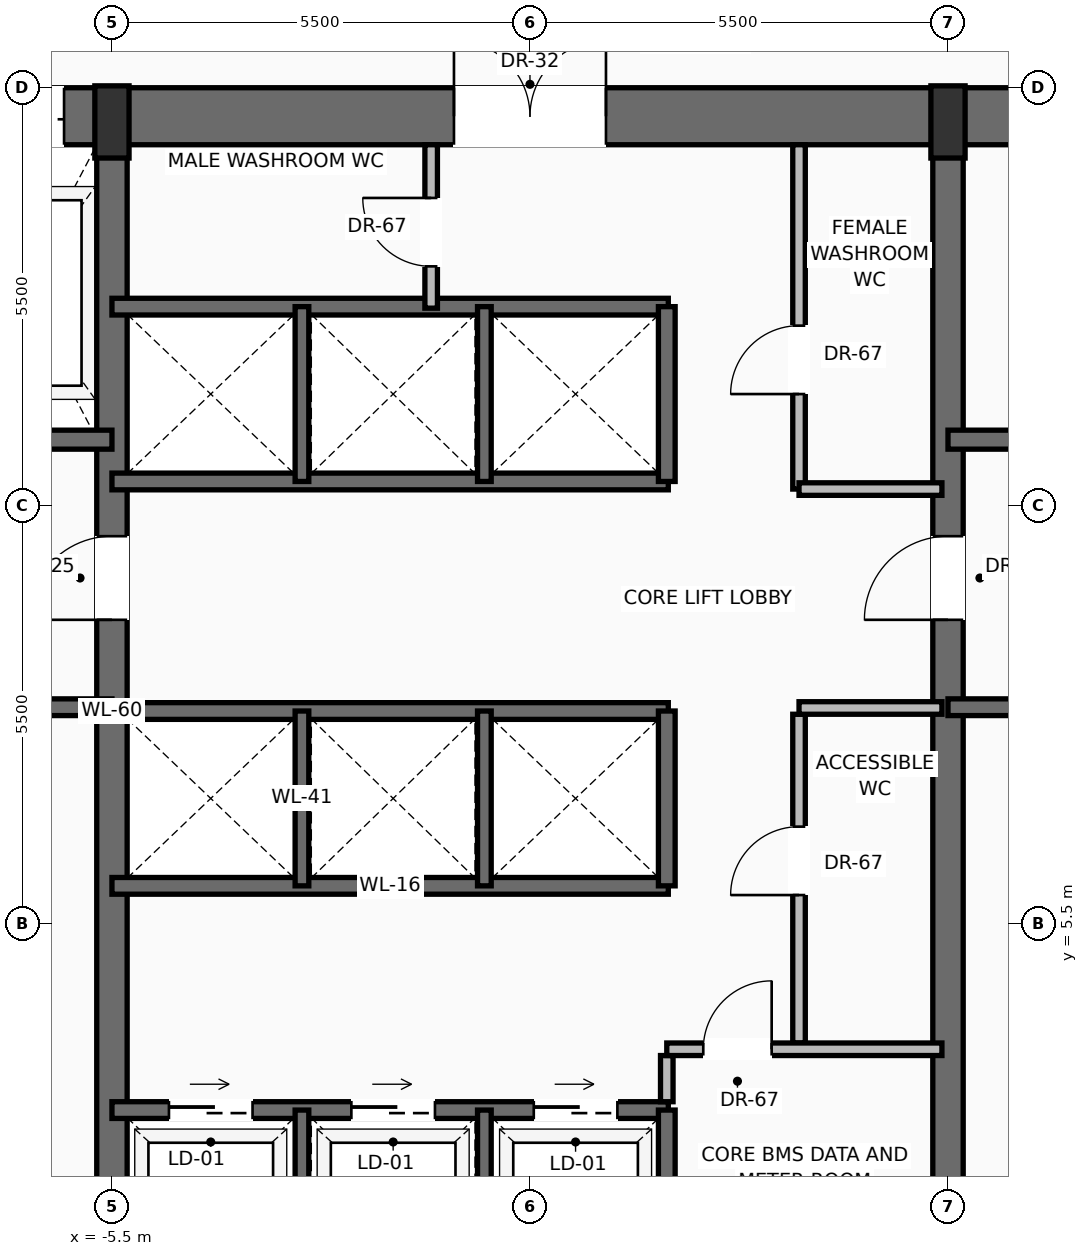
"""IFC4 building model, lengths in metres.
Left out: names, types, materials, properties, quantities, classifications, styles, units other than length and angle.
Written with IfcOpenShell. Run it as: python <this file> out.ifc"""

import sys

from ifc_helpers import new_model, si_unit, direction, frame, frame_2d, origin, origin_2d, place, context, subcontext, project, spatial, rectangle, extrude, source, transform, mapped, element, fill, save


model = new_model("IFC4")
c1 = context("Model", 3, precision=1e-05, world=origin(), true_north=direction((0.0, 1.0)))
c2 = subcontext(c1, "Body", "Model", "MODEL_VIEW")
j1 = project(units=[si_unit("LENGTHUNIT", "METRE"), si_unit("PLANEANGLEUNIT", "RADIAN")], contexts=[c1])
p1 = place(None, origin())
s1 = spatial("IfcSite", under=j1, at=p1, CompositionType="ELEMENT")
p2 = place(p1, origin())
s2 = spatial("IfcBuilding", under=s1, at=p2, CompositionType="ELEMENT")
p3 = place(p2, frame((0.0, 0.0, 87.7)))
s3 = spatial("IfcBuildingStorey", under=s2, at=p3, CompositionType="ELEMENT", Elevation=87.7)
p4 = place(p3, frame((-10.9, 16.125, 0.0), z_axis=(0.0, 0.0, 1.0), x_axis=(1.0, 0.0, 0.0)))
e1 = element("IfcWall", 1, at=p4, inside=s3, PredefinedType="SHEAR", context=c2, shape_type="SweptSolid", body=[
    extrude(rectangle(XDim=21.8, YDim=0.75, at=frame_2d((10.9, 0.0))), origin(), (0.0, 0.0, 1.0), 3.45),
])
p5 = place(p4, frame((3.47, 0.0, 0.0)))
e2 = element("IfcOpeningElement", 2, at=p5, cuts=e1, PredefinedType="OPENING", context=c2, shape_type="SweptSolid", body=[
    extrude(rectangle(XDim=1.3, YDim=2.3, at=frame_2d((0.65, 1.15))), frame((0.0, 0.385, 0.0), z_axis=(0.0, -1.0, 0.0), x_axis=(1.0, 0.0, 0.0)), (0.0, 0.0, 1.0), 0.77),
])
p6 = place(p4, frame((9.9, 0.0, 0.0)))
e3 = element("IfcOpeningElement", 3, at=p6, cuts=e1, PredefinedType="OPENING", context=c2, shape_type="SweptSolid", body=[
    extrude(rectangle(XDim=2.0, YDim=2.4, at=frame_2d((1.0, 1.2))), frame((0.0, 0.385, 0.0), z_axis=(0.0, -1.0, 0.0), x_axis=(1.0, 0.0, 0.0)), (0.0, 0.0, 1.0), 0.77),
])
p7 = place(p3, frame((-5.5, 0.475, 0.0), z_axis=(0.0, 0.0, 1.0), x_axis=(0.0, 1.0, 0.0)))
e4 = element("IfcWall", 4, at=p7, inside=s3, PredefinedType="SHEAR", context=c2, shape_type="SweptSolid", body=[
    extrude(rectangle(XDim=15.65, YDim=0.4, at=frame_2d((7.825, 0.0))), origin(), (0.0, 0.0, 1.0), 3.45),
])
p8 = place(p7, frame((9.025, 0.0, 0.0)))
e5 = element("IfcOpeningElement", 5, at=p8, cuts=e4, PredefinedType="OPENING", context=c2, shape_type="SweptSolid", body=[
    extrude(rectangle(XDim=1.1, YDim=2.2, at=frame_2d((0.55, 1.1))), frame((0.0, 0.21, 0.0), z_axis=(0.0, -1.0, 0.0), x_axis=(1.0, 0.0, 0.0)), (0.0, 0.0, 1.0), 0.42),
])
p9 = place(p3, frame((5.5, 0.475, 0.0), z_axis=(0.0, 0.0, 1.0), x_axis=(0.0, 1.0, 0.0)))
e6 = element("IfcWall", 6, at=p9, inside=s3, PredefinedType="SHEAR", context=c2, shape_type="SweptSolid", body=[
    extrude(rectangle(XDim=15.65, YDim=0.4, at=frame_2d((7.825, 0.0))), origin(), (0.0, 0.0, 1.0), 3.45),
])
p10 = place(p9, frame((9.025, 0.0, 0.0)))
e7 = element("IfcOpeningElement", 7, at=p10, cuts=e6, PredefinedType="OPENING", context=c2, shape_type="SweptSolid", body=[
    extrude(rectangle(XDim=1.1, YDim=2.2, at=frame_2d((0.55, 1.1))), frame((0.0, 0.21, 0.0), z_axis=(0.0, -1.0, 0.0), x_axis=(1.0, 0.0, 0.0)), (0.0, 0.0, 1.0), 0.42),
])
m1 = source(origin(), c2, "Body", "SweptSolid", [
    extrude(rectangle(XDim=0.45, YDim=0.95, at=origin_2d()), origin(), (0.0, 0.0, 1.0), 3.7),
])
for number, where, z_axis, x_axis in (
    (8, (-5.5, 16.05, 0.0), (0.0, 0.0, 1.0), (1.0, 0.0, 0.0)),
    (9, (5.5, 16.05, 0.0), (0.0, 0.0, 1.0), (1.0, 0.0, 0.0)),
):
    element("IfcColumn", number, at=place(p3, frame(where, z_axis=z_axis, x_axis=x_axis)), inside=s3, PredefinedType="PILASTER", context=c2, shape_type="MappedRepresentation", body=[
        mapped(m1, transform((0.0, 0.0, 0.0), scale=1.0)),
    ])
p11 = place(p3, frame((-5.5, 8.35, 0.0), z_axis=(0.0, 0.0, 1.0), x_axis=(-1.0, 0.0, 0.0)))
e10 = element("IfcWall", 10, at=p11, inside=s3, PredefinedType="SOLIDWALL", context=c2, shape_type="SweptSolid", body=[
    extrude(rectangle(XDim=4.65, YDim=0.22, at=frame_2d((2.325, 0.0))), origin(), (0.0, 0.0, 1.0), 3.45),
])
p12 = place(p11, frame((2.5, 0.0, 0.0)))
e11 = element("IfcOpeningElement", 11, at=p12, cuts=e10, PredefinedType="OPENING", context=c2, shape_type="SweptSolid", body=[
    extrude(rectangle(XDim=1.15, YDim=2.2, at=frame_2d((0.575, 1.1))), frame((0.0, 0.12, 0.0), z_axis=(0.0, -1.0, 0.0), x_axis=(1.0, 0.0, 0.0)), (0.0, 0.0, 1.0), 0.24),
])
p13 = place(p3, frame((-5.5, 11.87, 0.0), z_axis=(0.0, 0.0, 1.0), x_axis=(-1.0, 0.0, 0.0)))
e12 = element("IfcWall", 12, at=p13, inside=s3, PredefinedType="SOLIDWALL", context=c2, shape_type="SweptSolid", body=[
    extrude(rectangle(XDim=4.65, YDim=0.25, at=frame_2d((2.325, 0.0))), origin(), (0.0, 0.0, 1.0), 3.45),
])
p14 = place(p13, frame((2.95, 0.0, 0.0)))
e13 = element("IfcOpeningElement", 13, at=p14, cuts=e12, PredefinedType="OPENING", context=c2, shape_type="SweptSolid", body=[
    extrude(rectangle(XDim=1.2, YDim=2.25, at=frame_2d((0.6, 1.125))), frame((0.0, 0.135, 0.0), z_axis=(0.0, -1.0, 0.0), x_axis=(1.0, 0.0, 0.0)), (0.0, 0.0, 1.0), 0.27),
])
p15 = place(p3, frame((10.15, 8.35, 0.0), z_axis=(0.0, 0.0, 1.0), x_axis=(-1.0, 0.0, 0.0)))
e14 = element("IfcWall", 14, at=p15, inside=s3, PredefinedType="SOLIDWALL", context=c2, shape_type="SweptSolid", body=[
    extrude(rectangle(XDim=4.65, YDim=0.22, at=frame_2d((2.325, 0.0))), origin(), (0.0, 0.0, 1.0), 3.45),
])
p16 = place(p15, frame((1.0, 0.0, 0.0)))
e15 = element("IfcOpeningElement", 15, at=p16, cuts=e14, PredefinedType="OPENING", context=c2, shape_type="SweptSolid", body=[
    extrude(rectangle(XDim=1.15, YDim=2.2, at=frame_2d((0.575, 1.1))), frame((0.0, 0.12, 0.0), z_axis=(0.0, -1.0, 0.0), x_axis=(1.0, 0.0, 0.0)), (0.0, 0.0, 1.0), 0.24),
])
p17 = place(p3, frame((10.15, 11.87, 0.0), z_axis=(0.0, 0.0, 1.0), x_axis=(-1.0, 0.0, 0.0)))
e16 = element("IfcWall", 16, at=p17, inside=s3, PredefinedType="SOLIDWALL", context=c2, shape_type="SweptSolid", body=[
    extrude(rectangle(XDim=4.65, YDim=0.25, at=frame_2d((2.325, 0.0))), origin(), (0.0, 0.0, 1.0), 3.45),
])
p18 = place(p17, frame((0.5, 0.0, 0.0)))
e17 = element("IfcOpeningElement", 17, at=p18, cuts=e16, PredefinedType="OPENING", context=c2, shape_type="SweptSolid", body=[
    extrude(rectangle(XDim=1.2, YDim=2.25, at=frame_2d((0.6, 1.125))), frame((0.0, 0.135, 0.0), z_axis=(0.0, -1.0, 0.0), x_axis=(1.0, 0.0, 0.0)), (0.0, 0.0, 1.0), 0.27),
])
p19 = place(p3, frame((-5.5, 3.05, 0.0), z_axis=(0.0, 0.0, 1.0), x_axis=(1.0, 0.0, 0.0)))
e18 = element("IfcWall", 18, at=p19, inside=s3, PredefinedType="SOLIDWALL", context=c2, shape_type="SweptSolid", body=[
    extrude(rectangle(XDim=7.32, YDim=0.22, at=frame_2d((3.66, 0.0))), origin(), (0.0, 0.0, 1.0), 3.45),
])
p20 = place(p19, frame((0.75, 0.0, 0.0)))
e19 = element("IfcOpeningElement", 19, at=p20, cuts=e18, PredefinedType="OPENING", context=c2, shape_type="SweptSolid", body=[
    extrude(rectangle(XDim=1.1, YDim=2.2, at=frame_2d((0.55, 1.1))), frame((0.0, 0.12, 0.0), z_axis=(0.0, -1.0, 0.0), x_axis=(1.0, 0.0, 0.0)), (0.0, 0.0, 1.0), 0.24),
])
p21 = place(p19, frame((3.15, 0.0, 0.0)))
e20 = element("IfcOpeningElement", 20, at=p21, cuts=e18, PredefinedType="OPENING", context=c2, shape_type="SweptSolid", body=[
    extrude(rectangle(XDim=1.1, YDim=2.2, at=frame_2d((0.55, 1.1))), frame((0.0, 0.12, 0.0), z_axis=(0.0, -1.0, 0.0), x_axis=(1.0, 0.0, 0.0)), (0.0, 0.0, 1.0), 0.24),
])
p22 = place(p19, frame((5.55, 0.0, 0.0)))
e21 = element("IfcOpeningElement", 21, at=p22, cuts=e18, PredefinedType="OPENING", context=c2, shape_type="SweptSolid", body=[
    extrude(rectangle(XDim=1.1, YDim=2.2, at=frame_2d((0.55, 1.1))), frame((0.0, 0.12, 0.0), z_axis=(0.0, -1.0, 0.0), x_axis=(1.0, 0.0, 0.0)), (0.0, 0.0, 1.0), 0.24),
])
p23 = place(p3, frame((1.8, 0.85, 0.0), z_axis=(0.0, 0.0, 1.0), x_axis=(0.0, 1.0, 0.0)))
e22 = element("IfcWall", 22, at=p23, inside=s3, PredefinedType="SOLIDWALL", context=c2, shape_type="SweptSolid", body=[
    extrude(rectangle(XDim=2.2, YDim=0.22, at=frame_2d((1.1, 0.0))), origin(), (0.0, 0.0, 1.0), 3.45),
])
for number, where, z_axis, x_axis in (
    (23, (-3.0, 0.85, 0.0), (0.0, 0.0, 1.0), (0.0, 1.0, 0.0)),
    (24, (-0.6, 0.85, 0.0), (0.0, 0.0, 1.0), (0.0, 1.0, 0.0)),
):
    element("IfcWall", number, at=place(p3, frame(where, z_axis=z_axis, x_axis=x_axis)), inside=s3, PredefinedType="SOLIDWALL", context=c2, shape_type="SweptSolid", body=[
        extrude(rectangle(XDim=2.2, YDim=0.18, at=frame_2d((1.1, 0.0))), origin(), (0.0, 0.0, 1.0), 3.45),
    ])
p24 = place(p3, frame((1.8, 3.16, 0.0), z_axis=(0.0, 0.0, 1.0), x_axis=(0.0, 1.0, 0.0)))
e25 = element("IfcWall", 25, at=p24, inside=s3, PredefinedType="PARTITIONING", context=c2, shape_type="SweptSolid", body=[
    extrude(rectangle(XDim=0.608, YDim=0.165, at=frame_2d((0.304, 0.0))), origin(), (0.0, 0.0, 1.0), 3.442),
])
p25 = place(p3, frame((3.54, 3.933, 0.0), z_axis=(0.0, 0.0, 1.0), x_axis=(0.0, 1.0, 0.0)))
e26 = element("IfcWall", 26, at=p25, inside=s3, PredefinedType="PARTITIONING", context=c2, shape_type="SweptSolid", body=[
    extrude(rectangle(XDim=4.325, YDim=0.165, at=frame_2d((2.163, 0.0))), origin(), (0.0, 0.0, 1.0), 3.442),
])
p26 = place(p25, frame((1.946, 0.0, 0.0)))
e27 = element("IfcOpeningElement", 27, at=p26, cuts=e26, PredefinedType="OPENING", context=c2, shape_type="SweptSolid", body=[
    extrude(rectangle(XDim=0.9, YDim=2.1, at=frame_2d((0.45, 1.05))), frame((0.0, 0.093, 0.0), z_axis=(0.0, -1.0, 0.0), x_axis=(1.0, 0.0, 0.0)), (0.0, 0.0, 1.0), 0.185),
])
p27 = place(p3, frame((3.54, 8.34, 0.0), z_axis=(0.0, 0.0, 1.0), x_axis=(1.0, 0.0, 0.0)))
e28 = element("IfcWall", 28, at=p27, inside=s3, PredefinedType="PARTITIONING", context=c2, shape_type="SweptSolid", body=[
    extrude(rectangle(XDim=1.88, YDim=0.165, at=frame_2d((0.94, 0.0))), origin(), (0.0, 0.0, 1.0), 3.442),
])
p28 = place(p3, frame((1.8, 3.85, 0.0), z_axis=(0.0, 0.0, 1.0), x_axis=(1.0, 0.0, 0.0)))
e29 = element("IfcWall", 29, at=p28, inside=s3, PredefinedType="PARTITIONING", context=c2, shape_type="SweptSolid", body=[
    extrude(rectangle(XDim=3.62, YDim=0.165, at=frame_2d((1.81, 0.0))), origin(), (0.0, 0.0, 1.0), 3.442),
])
p29 = place(p28, frame((0.48, 0.0, 0.0)))
e30 = element("IfcOpeningElement", 30, at=p29, cuts=e29, PredefinedType="OPENING", context=c2, shape_type="SweptSolid", body=[
    extrude(rectangle(XDim=0.9, YDim=2.1, at=frame_2d((0.45, 1.05))), frame((0.0, 0.093, 0.0), z_axis=(0.0, -1.0, 0.0), x_axis=(1.0, 0.0, 0.0)), (0.0, 0.0, 1.0), 0.185),
])
for number, where, z_axis, x_axis in (
    (31, (-5.5, 6.0, 0.0), (0.0, 0.0, 1.0), (1.0, 0.0, 0.0)),
    (32, (-5.5, 8.3, 0.0), (0.0, 0.0, 1.0), (1.0, 0.0, 0.0)),
):
    element("IfcWall", number, at=place(p3, frame(where, z_axis=z_axis, x_axis=x_axis)), inside=s3, PredefinedType="SOLIDWALL", context=c2, shape_type="SweptSolid", body=[
        extrude(rectangle(XDim=7.32, YDim=0.22, at=frame_2d((3.66, 0.0))), origin(), (0.0, 0.0, 1.0), 3.45),
    ])
p30 = place(p3, frame((1.8, 6.0, 0.0), z_axis=(0.0, 0.0, 1.0), x_axis=(0.0, 1.0, 0.0)))
e33 = element("IfcWall", 33, at=p30, inside=s3, PredefinedType="SOLIDWALL", context=c2, shape_type="SweptSolid", body=[
    extrude(rectangle(XDim=2.3, YDim=0.22, at=frame_2d((1.15, 0.0))), origin(), (0.0, 0.0, 1.0), 3.45),
])
for number, where, z_axis, x_axis in (
    (34, (-3.0, 6.0, 0.0), (0.0, 0.0, 1.0), (0.0, 1.0, 0.0)),
    (35, (-0.6, 6.0, 0.0), (0.0, 0.0, 1.0), (0.0, 1.0, 0.0)),
):
    element("IfcWall", number, at=place(p3, frame(where, z_axis=z_axis, x_axis=x_axis)), inside=s3, PredefinedType="SOLIDWALL", context=c2, shape_type="SweptSolid", body=[
        extrude(rectangle(XDim=2.3, YDim=0.18, at=frame_2d((1.15, 0.0))), origin(), (0.0, 0.0, 1.0), 3.45),
    ])
for number, where, z_axis, x_axis in (
    (36, (-5.5, 11.32, 0.0), (0.0, 0.0, 1.0), (1.0, 0.0, 0.0)),
    (37, (-5.5, 13.62, 0.0), (0.0, 0.0, 1.0), (1.0, 0.0, 0.0)),
):
    element("IfcWall", number, at=place(p3, frame(where, z_axis=z_axis, x_axis=x_axis)), inside=s3, PredefinedType="SOLIDWALL", context=c2, shape_type="SweptSolid", body=[
        extrude(rectangle(XDim=7.32, YDim=0.22, at=frame_2d((3.66, 0.0))), origin(), (0.0, 0.0, 1.0), 3.45),
    ])
p31 = place(p3, frame((1.8, 11.32, 0.0), z_axis=(0.0, 0.0, 1.0), x_axis=(0.0, 1.0, 0.0)))
e38 = element("IfcWall", 38, at=p31, inside=s3, PredefinedType="SOLIDWALL", context=c2, shape_type="SweptSolid", body=[
    extrude(rectangle(XDim=2.3, YDim=0.22, at=frame_2d((1.15, 0.0))), origin(), (0.0, 0.0, 1.0), 3.45),
])
for number, where, z_axis, x_axis in (
    (39, (-3.0, 11.32, 0.0), (0.0, 0.0, 1.0), (0.0, 1.0, 0.0)),
    (40, (-0.6, 11.32, 0.0), (0.0, 0.0, 1.0), (0.0, 1.0, 0.0)),
):
    element("IfcWall", number, at=place(p3, frame(where, z_axis=z_axis, x_axis=x_axis)), inside=s3, PredefinedType="SOLIDWALL", context=c2, shape_type="SweptSolid", body=[
        extrude(rectangle(XDim=2.3, YDim=0.18, at=frame_2d((1.15, 0.0))), origin(), (0.0, 0.0, 1.0), 3.45),
    ])
p32 = place(p3, frame((-1.3, 13.6, 0.0), z_axis=(0.0, 0.0, 1.0), x_axis=(0.0, 1.0, 0.0)))
e41 = element("IfcWall", 41, at=p32, inside=s3, PredefinedType="PARTITIONING", context=c2, shape_type="SweptSolid", body=[
    extrude(rectangle(XDim=2.15, YDim=0.165, at=frame_2d((1.075, 0.0))), origin(), (0.0, 0.0, 1.0), 3.442),
])
p33 = place(p32, frame((0.55, 0.0, 0.0)))
e42 = element("IfcOpeningElement", 42, at=p33, cuts=e41, PredefinedType="OPENING", context=c2, shape_type="SweptSolid", body=[
    extrude(rectangle(XDim=0.9, YDim=2.1, at=frame_2d((0.45, 1.05))), frame((0.0, 0.093, 0.0), z_axis=(0.0, -1.0, 0.0), x_axis=(1.0, 0.0, 0.0)), (0.0, 0.0, 1.0), 0.185),
])
p34 = place(p3, frame((3.54, 11.22, 0.0), z_axis=(0.0, 0.0, 1.0), x_axis=(0.0, 1.0, 0.0)))
e43 = element("IfcWall", 43, at=p34, inside=s3, PredefinedType="PARTITIONING", context=c2, shape_type="SweptSolid", body=[
    extrude(rectangle(XDim=4.53, YDim=0.165, at=frame_2d((2.265, 0.0))), origin(), (0.0, 0.0, 1.0), 3.442),
])
p35 = place(p34, frame((1.25, 0.0, 0.0)))
e44 = element("IfcOpeningElement", 44, at=p35, cuts=e43, PredefinedType="OPENING", context=c2, shape_type="SweptSolid", body=[
    extrude(rectangle(XDim=0.9, YDim=2.1, at=frame_2d((0.45, 1.05))), frame((0.0, 0.093, 0.0), z_axis=(0.0, -1.0, 0.0), x_axis=(1.0, 0.0, 0.0)), (0.0, 0.0, 1.0), 0.185),
])
p36 = place(p3, frame((3.54, 11.22, 0.0), z_axis=(0.0, 0.0, 1.0), x_axis=(1.0, 0.0, 0.0)))
e45 = element("IfcWall", 45, at=p36, inside=s3, PredefinedType="PARTITIONING", context=c2, shape_type="SweptSolid", body=[
    extrude(rectangle(XDim=1.88, YDim=0.165, at=frame_2d((0.94, 0.0))), origin(), (0.0, 0.0, 1.0), 3.442),
])
m2 = source(origin(), c2, "Body", "SweptSolid", [
    extrude(rectangle(XDim=1.1, YDim=2.2, at=frame_2d((0.55, 1.1))), frame((0.0, 0.025, 0.0), z_axis=(0.0, -1.0, 0.0), x_axis=(1.0, 0.0, 0.0)), (0.0, 0.0, 1.0), 0.05),
])
p37 = place(p8, origin())
e46 = element("IfcDoor", 46, at=p37, inside=s3, OperationType="SINGLE_SWING_LEFT", PredefinedType="DOOR", context=c2, shape_type="MappedRepresentation", body=[
    mapped(m2, transform((0.0, 0.0, 0.0), scale=1.0)),
])
fill(e5, e46)
m3 = source(origin(), c2, "Body", "SweptSolid", [
    extrude(rectangle(XDim=1.3, YDim=2.3, at=frame_2d((0.65, 1.15))), frame((0.0, 0.025, 0.0), z_axis=(0.0, -1.0, 0.0), x_axis=(1.0, 0.0, 0.0)), (0.0, 0.0, 1.0), 0.05),
])
p38 = place(p5, origin())
e47 = element("IfcDoor", 47, at=p38, inside=s3, OperationType="SLIDING_TO_RIGHT", PredefinedType="DOOR", context=c2, shape_type="MappedRepresentation", body=[
    mapped(m3, transform((0.0, 0.0, 0.0), scale=1.0)),
])
fill(e2, e47)
p39 = place(p10, origin())
e48 = element("IfcDoor", 48, at=p39, inside=s3, OperationType="SINGLE_SWING_LEFT", PredefinedType="DOOR", context=c2, shape_type="MappedRepresentation", body=[
    mapped(m2, transform((0.0, 0.0, 0.0), scale=1.0)),
])
fill(e7, e48)
m4 = source(origin(), c2, "Body", "SweptSolid", [
    extrude(rectangle(XDim=2.0, YDim=2.4, at=frame_2d((1.0, 1.2))), frame((0.0, 0.025, 0.0), z_axis=(0.0, -1.0, 0.0), x_axis=(1.0, 0.0, 0.0)), (0.0, 0.0, 1.0), 0.05),
])
p40 = place(p6, origin())
e49 = element("IfcDoor", 49, at=p40, inside=s3, OperationType="DOUBLE_DOOR_SINGLE_SWING", PredefinedType="DOOR", context=c2, shape_type="MappedRepresentation", body=[
    mapped(m4, transform((0.0, 0.0, 0.0), scale=1.0)),
])
fill(e3, e49)
m5 = source(origin(), c2, "Body", "SweptSolid", [
    extrude(rectangle(XDim=1.1, YDim=2.2, at=frame_2d((0.55, 1.1))), frame((0.0, 0.025, 0.0), z_axis=(0.0, -1.0, 0.0), x_axis=(1.0, 0.0, 0.0)), (0.0, 0.0, 1.0), 0.05),
])
p41 = place(p20, origin())
e50 = element("IfcDoor", 50, at=p41, inside=s3, OperationType="SLIDING_TO_RIGHT", PredefinedType="DOOR", context=c2, shape_type="MappedRepresentation", body=[
    mapped(m5, transform((0.0, 0.0, 0.0), scale=1.0)),
])
fill(e19, e50)
p42 = place(p21, origin())
e51 = element("IfcDoor", 51, at=p42, inside=s3, OperationType="SLIDING_TO_RIGHT", PredefinedType="DOOR", context=c2, shape_type="MappedRepresentation", body=[
    mapped(m5, transform((0.0, 0.0, 0.0), scale=1.0)),
])
fill(e20, e51)
p43 = place(p22, origin())
e52 = element("IfcDoor", 52, at=p43, inside=s3, OperationType="SLIDING_TO_RIGHT", PredefinedType="DOOR", context=c2, shape_type="MappedRepresentation", body=[
    mapped(m5, transform((0.0, 0.0, 0.0), scale=1.0)),
])
fill(e21, e52)
m6 = source(origin(), c2, "Body", "SweptSolid", [
    extrude(rectangle(XDim=0.9, YDim=2.1, at=frame_2d((0.45, 1.05))), frame((0.0, 0.025, 0.0), z_axis=(0.0, -1.0, 0.0), x_axis=(1.0, 0.0, 0.0)), (0.0, 0.0, 1.0), 0.05),
])
p44 = place(p29, origin())
e53 = element("IfcDoor", 53, at=p44, inside=s3, OperationType="SINGLE_SWING_RIGHT", PredefinedType="DOOR", context=c2, shape_type="MappedRepresentation", body=[
    mapped(m6, transform((0.0, 0.0, 0.0), scale=1.0)),
])
fill(e30, e53)
p45 = place(p26, origin())
e54 = element("IfcDoor", 54, at=p45, inside=s3, OperationType="SINGLE_SWING_LEFT", PredefinedType="DOOR", context=c2, shape_type="MappedRepresentation", body=[
    mapped(m6, transform((0.0, 0.0, 0.0), scale=1.0)),
])
fill(e27, e54)
p46 = place(p33, origin())
e55 = element("IfcDoor", 55, at=p46, inside=s3, OperationType="SINGLE_SWING_RIGHT", PredefinedType="DOOR", context=c2, shape_type="MappedRepresentation", body=[
    mapped(m6, transform((0.0, 0.0, 0.0), scale=1.0)),
])
fill(e42, e55)
p47 = place(p35, origin())
e56 = element("IfcDoor", 56, at=p47, inside=s3, OperationType="SINGLE_SWING_LEFT", PredefinedType="DOOR", context=c2, shape_type="MappedRepresentation", body=[
    mapped(m6, transform((0.0, 0.0, 0.0), scale=1.0)),
])
fill(e44, e56)
save(model, sys.argv[1])
